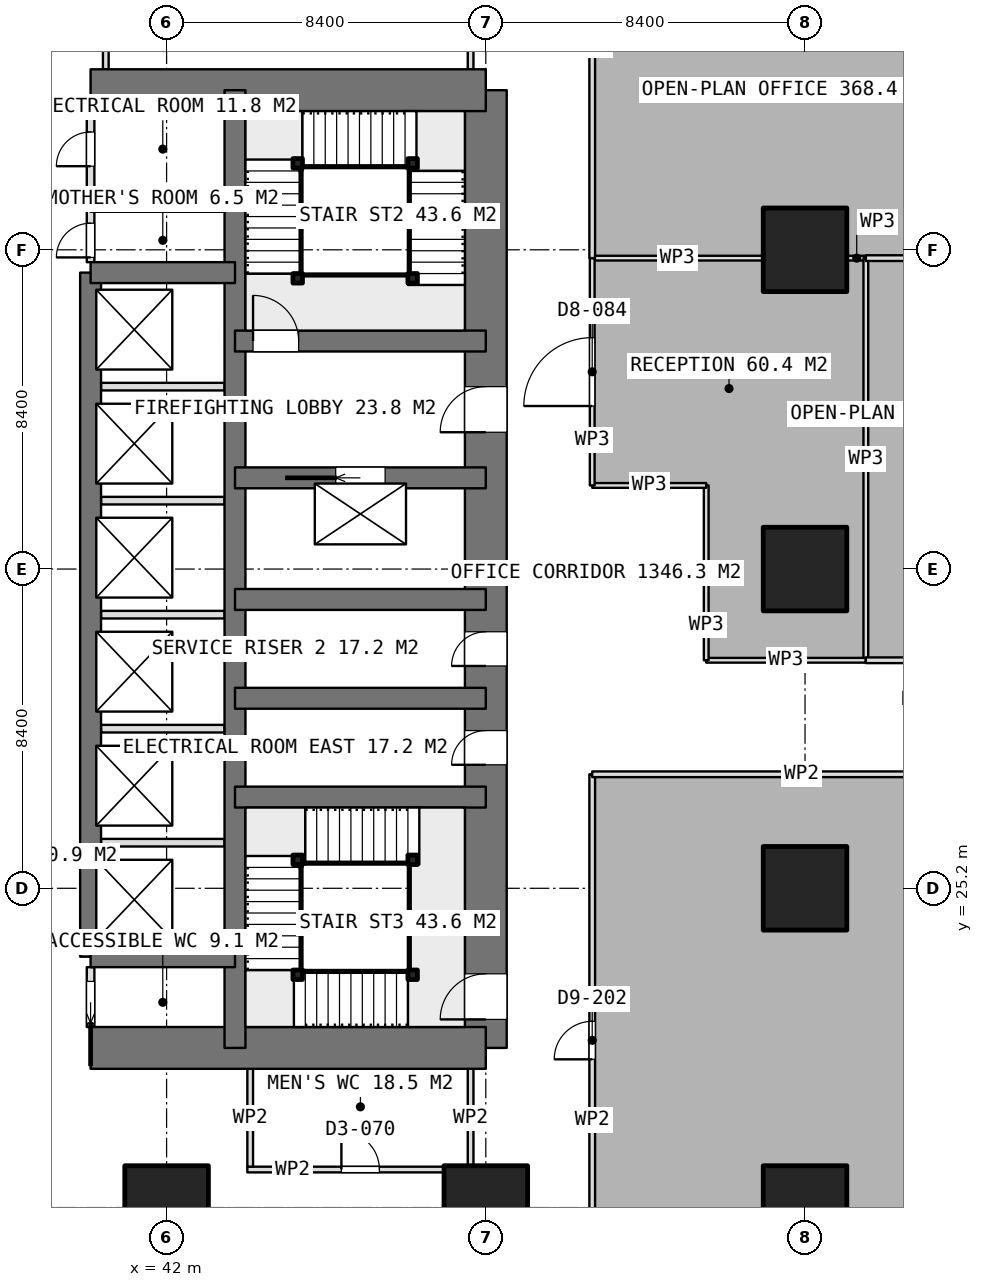
"""IFC4 building model, lengths in metres.
Left out: names, types, materials, properties, quantities, classifications, styles, units other than length and angle.
Written with IfcOpenShell. Run it as: python <this file> out.ifc"""

import sys

from ifc_helpers import new_model, si_unit, direction, frame, frame_2d, origin, origin_2d, place, context, subcontext, project, spatial, rectangle, extrude, element, fill, save


model = new_model("IFC4")
c1 = context("Model", 3, precision=1e-05, world=origin(), true_north=direction((0.0, 1.0)))
c2 = subcontext(c1, "Body", "Model", "MODEL_VIEW")
j1 = project(units=[si_unit("LENGTHUNIT", "METRE"), si_unit("PLANEANGLEUNIT", "RADIAN")], contexts=[c1])
p1 = place(None, origin())
s1 = spatial("IfcSite", under=j1, at=p1, CompositionType="ELEMENT")
p2 = place(p1, origin())
s2 = spatial("IfcBuilding", under=s1, at=p2, CompositionType="ELEMENT")
p3 = place(p2, frame((0.0, 0.0, 62.9)))
s3 = spatial("IfcBuildingStorey", under=s2, at=p3, CompositionType="ELEMENT", Elevation=62.9)
for number, where, z_axis, x_axis in (
    (1, (40.0, 21.0, 0.0), (0.0, 0.0, 1.0), (1.0, 0.0, 0.0)),
    (2, (40.0, 46.2, 0.0), (0.0, 0.0, 1.0), (1.0, 0.0, 0.0)),
):
    element("IfcWall", number, at=place(p3, frame(where, z_axis=z_axis, x_axis=x_axis)), inside=s3, PredefinedType="SHEAR", context=c2, shape_type="SweptSolid", body=[
        extrude(rectangle(XDim=10.4, YDim=1.1, at=frame_2d((5.2, 0.0))), origin(), (0.0, 0.0, 1.0), 3.75),
    ])
p4 = place(p3, frame((50.4, 21.0, 0.0), z_axis=(0.0, 0.0, 1.0), x_axis=(0.0, 1.0, 0.0)))
e3 = element("IfcWall", 3, at=p4, inside=s3, PredefinedType="SHEAR", context=c2, shape_type="SweptSolid", body=[
    extrude(rectangle(XDim=25.2, YDim=1.1, at=frame_2d((12.6, 0.0))), origin(), (0.0, 0.0, 1.0), 3.75),
])
p5 = place(p4, frame((16.2, 0.0, 0.0)))
e4 = element("IfcOpeningElement", 4, at=p5, cuts=e3, PredefinedType="OPENING", context=c2, shape_type="SweptSolid", body=[
    extrude(rectangle(XDim=1.2, YDim=2.1, at=frame_2d((0.6, 1.05))), frame((0.0, 0.56, 0.0), z_axis=(0.0, -1.0, 0.0), x_axis=(1.0, 0.0, 0.0)), (0.0, 0.0, 1.0), 1.12),
])
p6 = place(p4, frame((10.05, 0.0, 0.0)))
e5 = element("IfcOpeningElement", 5, at=p6, cuts=e3, PredefinedType="OPENING", context=c2, shape_type="SweptSolid", body=[
    extrude(rectangle(XDim=0.9, YDim=2.1, at=frame_2d((0.45, 1.05))), frame((0.0, 0.56, 0.0), z_axis=(0.0, -1.0, 0.0), x_axis=(1.0, 0.0, 0.0)), (0.0, 0.0, 1.0), 1.12),
])
p7 = place(p4, frame((7.45, 0.0, 0.0)))
e6 = element("IfcOpeningElement", 6, at=p7, cuts=e3, PredefinedType="OPENING", context=c2, shape_type="SweptSolid", body=[
    extrude(rectangle(XDim=0.9, YDim=2.1, at=frame_2d((0.45, 1.05))), frame((0.0, 0.56, 0.0), z_axis=(0.0, -1.0, 0.0), x_axis=(1.0, 0.0, 0.0)), (0.0, 0.0, 1.0), 1.12),
])
p8 = place(p4, frame((0.75, 0.0, 0.0)))
e7 = element("IfcOpeningElement", 7, at=p8, cuts=e3, PredefinedType="OPENING", context=c2, shape_type="SweptSolid", body=[
    extrude(rectangle(XDim=1.2, YDim=2.1, at=frame_2d((0.6, 1.05))), frame((0.0, 0.56, 0.0), z_axis=(0.0, -1.0, 0.0), x_axis=(1.0, 0.0, 0.0)), (0.0, 0.0, 1.0), 1.12),
])
p9 = place(p3, frame((43.8, 21.0, 0.0), z_axis=(0.0, 0.0, 1.0), x_axis=(0.0, 1.0, 0.0)))
e8 = element("IfcWall", 8, at=p9, inside=s3, PredefinedType="SHEAR", context=c2, shape_type="SweptSolid", body=[
    extrude(rectangle(XDim=25.2, YDim=0.55, at=frame_2d((12.6, 0.0))), origin(), (0.0, 0.0, 1.0), 3.75),
])
p10 = place(p3, frame((40.0, 23.4, 0.0), z_axis=(0.0, 0.0, 1.0), x_axis=(0.0, 1.0, 0.0)))
e9 = element("IfcWall", 9, at=p10, inside=s3, PredefinedType="SHEAR", context=c2, shape_type="SweptSolid", body=[
    extrude(rectangle(XDim=18.0, YDim=0.55, at=frame_2d((9.0, 0.0))), origin(), (0.0, 0.0, 1.0), 3.75),
])
for number, where, z_axis, x_axis in (
    (10, (40.0, 23.4, 0.0), (0.0, 0.0, 1.0), (1.0, 0.0, 0.0)),
    (11, (40.0, 41.4, 0.0), (0.0, 0.0, 1.0), (1.0, 0.0, 0.0)),
):
    element("IfcWall", number, at=place(p3, frame(where, z_axis=z_axis, x_axis=x_axis)), inside=s3, PredefinedType="SHEAR", context=c2, shape_type="SweptSolid", body=[
        extrude(rectangle(XDim=3.8, YDim=0.55, at=frame_2d((1.9, 0.0))), origin(), (0.0, 0.0, 1.0), 3.75),
    ])
for number, where, z_axis, x_axis in (
    (12, (43.8, 27.6, 0.0), (0.0, 0.0, 1.0), (1.0, 0.0, 0.0)),
    (13, (43.8, 30.2, 0.0), (0.0, 0.0, 1.0), (1.0, 0.0, 0.0)),
    (14, (43.8, 32.8, 0.0), (0.0, 0.0, 1.0), (1.0, 0.0, 0.0)),
):
    element("IfcWall", number, at=place(p3, frame(where, z_axis=z_axis, x_axis=x_axis)), inside=s3, PredefinedType="SHEAR", context=c2, shape_type="SweptSolid", body=[
        extrude(rectangle(XDim=6.6, YDim=0.55, at=frame_2d((3.3, 0.0))), origin(), (0.0, 0.0, 1.0), 3.75),
    ])
p11 = place(p3, frame((43.8, 36.0, 0.0), z_axis=(0.0, 0.0, 1.0), x_axis=(1.0, 0.0, 0.0)))
e15 = element("IfcWall", 15, at=p11, inside=s3, PredefinedType="SHEAR", context=c2, shape_type="SweptSolid", body=[
    extrude(rectangle(XDim=6.6, YDim=0.55, at=frame_2d((3.3, 0.0))), origin(), (0.0, 0.0, 1.0), 3.75),
])
p12 = place(p11, frame((2.65, 0.0, 0.0)))
e16 = element("IfcOpeningElement", 16, at=p12, cuts=e15, PredefinedType="OPENING", context=c2, shape_type="SweptSolid", body=[
    extrude(rectangle(XDim=1.3, YDim=2.1, at=frame_2d((0.65, 1.05))), frame((0.0, 0.285, 0.0), z_axis=(0.0, -1.0, 0.0), x_axis=(1.0, 0.0, 0.0)), (0.0, 0.0, 1.0), 0.57),
])
p13 = place(p3, frame((43.8, 39.6, 0.0), z_axis=(0.0, 0.0, 1.0), x_axis=(1.0, 0.0, 0.0)))
e17 = element("IfcWall", 17, at=p13, inside=s3, PredefinedType="SHEAR", context=c2, shape_type="SweptSolid", body=[
    extrude(rectangle(XDim=6.6, YDim=0.55, at=frame_2d((3.3, 0.0))), origin(), (0.0, 0.0, 1.0), 3.75),
])
p14 = place(p13, frame((0.475, 0.0, 0.0)))
e18 = element("IfcOpeningElement", 18, at=p14, cuts=e17, PredefinedType="OPENING", context=c2, shape_type="SweptSolid", body=[
    extrude(rectangle(XDim=1.2, YDim=2.1, at=frame_2d((0.6, 1.05))), frame((0.0, 0.285, 0.0), z_axis=(0.0, -1.0, 0.0), x_axis=(1.0, 0.0, 0.0)), (0.0, 0.0, 1.0), 0.57),
])
for number, where, z_axis, x_axis in (
    (19, (42.0, 16.8, 0.0), (0.0, 0.0, 1.0), (1.0, 0.0, 0.0)),
    (20, (50.4, 16.8, 0.0), (0.0, 0.0, 1.0), (1.0, 0.0, 0.0)),
    (21, (58.8, 16.8, 0.0), (0.0, 0.0, 1.0), (1.0, 0.0, 0.0)),
    (22, (58.8, 25.2, 0.0), (0.0, 0.0, 1.0), (1.0, 0.0, 0.0)),
    (23, (58.8, 33.6, 0.0), (0.0, 0.0, 1.0), (1.0, 0.0, 0.0)),
    (24, (58.8, 42.0, 0.0), (0.0, 0.0, 1.0), (1.0, 0.0, 0.0)),
):
    element("IfcColumn", number, at=place(p3, frame(where, z_axis=z_axis, x_axis=x_axis)), inside=s3, PredefinedType="COLUMN", context=c2, shape_type="SweptSolid", body=[
        extrude(rectangle(XDim=2.2, YDim=2.2, at=origin_2d()), origin(), (0.0, 0.0, 1.0), 3.75),
    ])
for number, where, z_axis, x_axis in (
    (25, (40.275, 26.4, 0.0), (0.0, 0.0, 1.0), (1.0, 0.0, 0.0)),
    (26, (40.275, 29.4, 0.0), (0.0, 0.0, 1.0), (1.0, 0.0, 0.0)),
    (27, (40.275, 32.4, 0.0), (0.0, 0.0, 1.0), (1.0, 0.0, 0.0)),
    (28, (40.275, 35.4, 0.0), (0.0, 0.0, 1.0), (1.0, 0.0, 0.0)),
    (29, (40.275, 38.4, 0.0), (0.0, 0.0, 1.0), (1.0, 0.0, 0.0)),
):
    element("IfcWall", number, at=place(p3, frame(where, z_axis=z_axis, x_axis=x_axis)), inside=s3, PredefinedType="PARTITIONING", context=c2, shape_type="SweptSolid", body=[
        extrude(rectangle(XDim=3.25, YDim=0.2, at=frame_2d((1.625, 0.0))), origin(), (0.0, 0.0, 1.0), 3.5),
    ])
p15 = place(p3, frame((40.0, 21.55, 0.0), z_axis=(0.0, 0.0, 1.0), x_axis=(0.0, 1.0, 0.0)))
e30 = element("IfcWall", 30, at=p15, inside=s3, PredefinedType="PARTITIONING", context=c2, shape_type="SweptSolid", body=[
    extrude(rectangle(XDim=1.575, YDim=0.2, at=frame_2d((0.788, 0.0))), origin(), (0.0, 0.0, 1.0), 3.5),
])
p16 = place(p15, frame((0.1, 0.0, 0.0)))
e31 = element("IfcOpeningElement", 31, at=p16, cuts=e30, PredefinedType="OPENING", context=c2, shape_type="SweptSolid", body=[
    extrude(rectangle(XDim=1.1, YDim=2.1, at=frame_2d((0.55, 1.05))), frame((0.0, 0.11, 0.0), z_axis=(0.0, -1.0, 0.0), x_axis=(1.0, 0.0, 0.0)), (0.0, 0.0, 1.0), 0.22),
])
p17 = place(p3, frame((40.0, 41.675, 0.0), z_axis=(0.0, 0.0, 1.0), x_axis=(0.0, 1.0, 0.0)))
e32 = element("IfcWall", 32, at=p17, inside=s3, PredefinedType="PARTITIONING", context=c2, shape_type="SweptSolid", body=[
    extrude(rectangle(XDim=3.975, YDim=0.2, at=frame_2d((1.987, 0.0))), origin(), (0.0, 0.0, 1.0), 3.5),
])
p18 = place(p17, frame((2.525, 0.0, 0.0)))
e33 = element("IfcOpeningElement", 33, at=p18, cuts=e32, PredefinedType="OPENING", context=c2, shape_type="SweptSolid", body=[
    extrude(rectangle(XDim=0.9, YDim=2.1, at=frame_2d((0.45, 1.05))), frame((0.0, 0.11, 0.0), z_axis=(0.0, -1.0, 0.0), x_axis=(1.0, 0.0, 0.0)), (0.0, 0.0, 1.0), 0.22),
])
p19 = place(p17, frame((0.125, 0.0, 0.0)))
e34 = element("IfcOpeningElement", 34, at=p19, cuts=e32, PredefinedType="OPENING", context=c2, shape_type="SweptSolid", body=[
    extrude(rectangle(XDim=0.9, YDim=2.1, at=frame_2d((0.45, 1.05))), frame((0.0, 0.11, 0.0), z_axis=(0.0, -1.0, 0.0), x_axis=(1.0, 0.0, 0.0)), (0.0, 0.0, 1.0), 0.22),
])
p20 = place(p3, frame((40.0, 43.1, 0.0), z_axis=(0.0, 0.0, 1.0), x_axis=(1.0, 0.0, 0.0)))
e35 = element("IfcWall", 35, at=p20, inside=s3, PredefinedType="PARTITIONING", context=c2, shape_type="SweptSolid", body=[
    extrude(rectangle(XDim=3.525, YDim=0.2, at=frame_2d((1.762, 0.0))), origin(), (0.0, 0.0, 1.0), 3.5),
])
for number, where, z_axis, x_axis in (
    (36, (40.4, 46.75, 0.0), (0.0, 0.0, 1.0), (0.0, 1.0, 0.0)),
    (37, (50.0, 46.75, 0.0), (0.0, 0.0, 1.0), (0.0, 1.0, 0.0)),
):
    element("IfcWall", number, at=place(p3, frame(where, z_axis=z_axis, x_axis=x_axis)), inside=s3, PredefinedType="PARTITIONING", context=c2, shape_type="SweptSolid", body=[
        extrude(rectangle(XDim=2.575, YDim=0.15, at=frame_2d((1.288, 0.0))), origin(), (0.0, 0.0, 1.0), 3.5),
    ])
p21 = place(p3, frame((44.125, 17.8, 0.0), z_axis=(0.0, 0.0, 1.0), x_axis=(1.0, 0.0, 0.0)))
e38 = element("IfcWall", 38, at=p21, inside=s3, PredefinedType="PARTITIONING", context=c2, shape_type="SweptSolid", body=[
    extrude(rectangle(XDim=5.95, YDim=0.15, at=frame_2d((2.975, 0.0))), origin(), (0.0, 0.0, 1.0), 3.5),
])
p22 = place(p21, frame((2.475, 0.0, 0.0)))
e39 = element("IfcOpeningElement", 39, at=p22, cuts=e38, PredefinedType="OPENING", context=c2, shape_type="SweptSolid", body=[
    extrude(rectangle(XDim=1.0, YDim=2.1, at=frame_2d((0.5, 1.05))), frame((0.0, 0.085, 0.0), z_axis=(0.0, -1.0, 0.0), x_axis=(1.0, 0.0, 0.0)), (0.0, 0.0, 1.0), 0.17),
])
for number, where, z_axis, x_axis in (
    (40, (44.2, 17.875, 0.0), (0.0, 0.0, 1.0), (0.0, 1.0, 0.0)),
    (41, (50.0, 17.875, 0.0), (0.0, 0.0, 1.0), (0.0, 1.0, 0.0)),
):
    element("IfcWall", number, at=place(p3, frame(where, z_axis=z_axis, x_axis=x_axis)), inside=s3, PredefinedType="PARTITIONING", context=c2, shape_type="SweptSolid", body=[
        extrude(rectangle(XDim=2.575, YDim=0.15, at=frame_2d((1.288, 0.0))), origin(), (0.0, 0.0, 1.0), 3.5),
    ])
p23 = place(p3, frame((53.2, 14.2, 0.0), z_axis=(0.0, 0.0, 1.0), x_axis=(0.0, 1.0, 0.0)))
e42 = element("IfcWall", 42, at=p23, inside=s3, PredefinedType="PARTITIONING", context=c2, shape_type="SweptSolid", body=[
    extrude(rectangle(XDim=14.0, YDim=0.15, at=frame_2d((7.0, 0.0))), origin(), (0.0, 0.0, 1.0), 3.5),
])
p24 = place(p23, frame((6.5, 0.0, 0.0)))
e43 = element("IfcOpeningElement", 43, at=p24, cuts=e42, PredefinedType="OPENING", context=c2, shape_type="SweptSolid", body=[
    extrude(rectangle(XDim=1.0, YDim=2.1, at=frame_2d((0.5, 1.05))), frame((0.0, 0.085, 0.0), z_axis=(0.0, -1.0, 0.0), x_axis=(1.0, 0.0, 0.0)), (0.0, 0.0, 1.0), 0.17),
])
p25 = place(p3, frame((53.2, 28.2, 0.0), z_axis=(0.0, 0.0, 1.0), x_axis=(1.0, 0.0, 0.0)))
e44 = element("IfcWall", 44, at=p25, inside=s3, PredefinedType="PARTITIONING", context=c2, shape_type="SweptSolid", body=[
    extrude(rectangle(XDim=11.019, YDim=0.15, at=frame_2d((5.51, 0.0))), origin(), (0.0, 0.0, 1.0), 3.5),
])
p26 = place(p3, frame((53.2, 41.781, 0.0), z_axis=(0.0, 0.0, 1.0), x_axis=(1.0, 0.0, 0.0)))
e45 = element("IfcWall", 45, at=p26, inside=s3, PredefinedType="PARTITIONING", context=c2, shape_type="SweptSolid", body=[
    extrude(rectangle(XDim=4.48, YDim=0.125, at=frame_2d((2.24, 0.0))), origin(), (0.0, 0.0, 1.0), 3.5),
])
p27 = place(p3, frame((59.92, 41.781, 0.0), z_axis=(0.0, 0.0, 1.0), x_axis=(1.0, 0.0, 0.0)))
e46 = element("IfcWall", 46, at=p27, inside=s3, PredefinedType="PARTITIONING", context=c2, shape_type="SweptSolid", body=[
    extrude(rectangle(XDim=0.48, YDim=0.125, at=frame_2d((0.24, 0.0))), origin(), (0.0, 0.0, 1.0), 3.5),
])
p28 = place(p3, frame((60.4, 41.781, 0.0), z_axis=(0.0, 0.0, 1.0), x_axis=(0.0, -1.0, 0.0)))
e47 = element("IfcWall", 47, at=p28, inside=s3, PredefinedType="PARTITIONING", context=c2, shape_type="SweptSolid", body=[
    extrude(rectangle(XDim=10.581, YDim=0.125, at=frame_2d((5.291, 0.0))), origin(), (0.0, 0.0, 1.0), 3.5),
])
p29 = place(p3, frame((60.4, 31.2, 0.0), z_axis=(0.0, 0.0, 1.0), x_axis=(-1.0, 0.0, 0.0)))
e48 = element("IfcWall", 48, at=p29, inside=s3, PredefinedType="PARTITIONING", context=c2, shape_type="SweptSolid", body=[
    extrude(rectangle(XDim=4.2, YDim=0.125, at=frame_2d((2.1, 0.0))), origin(), (0.0, 0.0, 1.0), 3.5),
])
p30 = place(p3, frame((56.2, 31.2, 0.0), z_axis=(0.0, 0.0, 1.0), x_axis=(0.0, 1.0, 0.0)))
e49 = element("IfcWall", 49, at=p30, inside=s3, PredefinedType="PARTITIONING", context=c2, shape_type="SweptSolid", body=[
    extrude(rectangle(XDim=4.6, YDim=0.125, at=frame_2d((2.3, 0.0))), origin(), (0.0, 0.0, 1.0), 3.5),
])
p31 = place(p3, frame((56.2, 35.8, 0.0), z_axis=(0.0, 0.0, 1.0), x_axis=(-1.0, 0.0, 0.0)))
e50 = element("IfcWall", 50, at=p31, inside=s3, PredefinedType="PARTITIONING", context=c2, shape_type="SweptSolid", body=[
    extrude(rectangle(XDim=3.0, YDim=0.125, at=frame_2d((1.5, 0.0))), origin(), (0.0, 0.0, 1.0), 3.5),
])
p32 = place(p3, frame((53.2, 35.8, 0.0), z_axis=(0.0, 0.0, 1.0), x_axis=(0.0, 1.0, 0.0)))
e51 = element("IfcWall", 51, at=p32, inside=s3, PredefinedType="PARTITIONING", context=c2, shape_type="SweptSolid", body=[
    extrude(rectangle(XDim=5.981, YDim=0.125, at=frame_2d((2.99, 0.0))), origin(), (0.0, 0.0, 1.0), 3.5),
])
p33 = place(p32, frame((2.09, 0.0, 0.0)))
e52 = element("IfcOpeningElement", 52, at=p33, cuts=e51, PredefinedType="OPENING", context=c2, shape_type="SweptSolid", body=[
    extrude(rectangle(XDim=1.8, YDim=2.1, at=frame_2d((0.9, 1.05))), frame((0.0, 0.073, 0.0), z_axis=(0.0, -1.0, 0.0), x_axis=(1.0, 0.0, 0.0)), (0.0, 0.0, 1.0), 0.145),
])
p34 = place(p3, frame((64.091, 31.2, 0.0), z_axis=(0.0, 0.0, 1.0), x_axis=(-1.0, 0.0, 0.0)))
e53 = element("IfcWall", 53, at=p34, inside=s3, PredefinedType="PARTITIONING", context=c2, shape_type="SweptSolid", body=[
    extrude(rectangle(XDim=3.691, YDim=0.15, at=frame_2d((1.846, 0.0))), origin(), (0.0, 0.0, 1.0), 3.5),
])
p35 = place(p34, frame((1.346, 0.0, 0.0)))
e54 = element("IfcOpeningElement", 54, at=p35, cuts=e53, PredefinedType="OPENING", context=c2, shape_type="SweptSolid", body=[
    extrude(rectangle(XDim=1.0, YDim=2.1, at=frame_2d((0.5, 1.05))), frame((0.0, 0.085, 0.0), z_axis=(0.0, -1.0, 0.0), x_axis=(1.0, 0.0, 0.0)), (0.0, 0.0, 1.0), 0.17),
])
p36 = place(p3, frame((60.4, 41.781, 0.0), z_axis=(0.0, 0.0, 1.0), x_axis=(1.0, 0.0, 0.0)))
e55 = element("IfcWall", 55, at=p36, inside=s3, PredefinedType="PARTITIONING", context=c2, shape_type="SweptSolid", body=[
    extrude(rectangle(XDim=3.239, YDim=0.15, at=frame_2d((1.62, 0.0))), origin(), (0.0, 0.0, 1.0), 3.5),
])
p37 = place(p3, frame((53.2, 41.782, 0.0), z_axis=(0.0, 0.0, 1.0), x_axis=(0.0, 1.0, 0.0)))
e56 = element("IfcWall", 56, at=p37, inside=s3, PredefinedType="PARTITIONING", context=c2, shape_type="SweptSolid", body=[
    extrude(rectangle(XDim=11.218, YDim=0.15, at=frame_2d((5.609, 0.0))), origin(), (0.0, 0.0, 1.0), 3.5),
])
for number, where, z_axis, x_axis in (
    (57, (45.45, 41.25, 0.0), (0.0, 0.0, 1.0), (1.0, 0.0, 0.0)),
    (58, (45.45, 44.275, 0.0), (0.0, 0.0, 1.0), (1.0, 0.0, 0.0)),
    (59, (48.475, 44.275, 0.0), (0.0, 0.0, 1.0), (1.0, 0.0, 0.0)),
    (60, (48.475, 41.25, 0.0), (0.0, 0.0, 1.0), (1.0, 0.0, 0.0)),
    (61, (48.475, 22.925, 0.0), (0.0, 0.0, 1.0), (1.0, 0.0, 0.0)),
    (62, (45.45, 22.925, 0.0), (0.0, 0.0, 1.0), (1.0, 0.0, 0.0)),
    (63, (45.45, 25.95, 0.0), (0.0, 0.0, 1.0), (1.0, 0.0, 0.0)),
    (64, (48.475, 25.95, 0.0), (0.0, 0.0, 1.0), (1.0, 0.0, 0.0)),
):
    element("IfcColumn", number, at=place(p3, frame(where, z_axis=z_axis, x_axis=x_axis)), inside=s3, PredefinedType="COLUMN", context=c2, shape_type="SweptSolid", body=[
        extrude(rectangle(XDim=0.25, YDim=0.25, at=origin_2d()), origin(), (0.0, 0.0, 1.0), 3.75),
    ])
p38 = place(p5, origin())
e65 = element("IfcDoor", 65, at=p38, inside=s3, OperationType="SINGLE_SWING_LEFT", PredefinedType="DOOR", context=c2, shape_type="SweptSolid", body=[
    extrude(rectangle(XDim=1.2, YDim=2.1, at=frame_2d((0.6, 1.05))), frame((0.0, 0.025, 0.0), z_axis=(0.0, -1.0, 0.0), x_axis=(1.0, 0.0, 0.0)), (0.0, 0.0, 1.0), 0.05),
])
fill(e4, e65)
p39 = place(p6, origin())
e66 = element("IfcDoor", 66, at=p39, inside=s3, OperationType="SINGLE_SWING_LEFT", PredefinedType="DOOR", context=c2, shape_type="SweptSolid", body=[
    extrude(rectangle(XDim=0.9, YDim=2.1, at=frame_2d((0.45, 1.05))), frame((0.0, 0.025, 0.0), z_axis=(0.0, -1.0, 0.0), x_axis=(1.0, 0.0, 0.0)), (0.0, 0.0, 1.0), 0.05),
])
fill(e5, e66)
p40 = place(p7, origin())
e67 = element("IfcDoor", 67, at=p40, inside=s3, OperationType="SINGLE_SWING_LEFT", PredefinedType="DOOR", context=c2, shape_type="SweptSolid", body=[
    extrude(rectangle(XDim=0.9, YDim=2.1, at=frame_2d((0.45, 1.05))), frame((0.0, 0.025, 0.0), z_axis=(0.0, -1.0, 0.0), x_axis=(1.0, 0.0, 0.0)), (0.0, 0.0, 1.0), 0.05),
])
fill(e6, e67)
p41 = place(p16, origin())
e68 = element("IfcDoor", 68, at=p41, inside=s3, OperationType="SLIDING_TO_LEFT", PredefinedType="DOOR", context=c2, shape_type="SweptSolid", body=[
    extrude(rectangle(XDim=1.1, YDim=2.1, at=frame_2d((0.55, 1.05))), frame((0.0, 0.025, 0.0), z_axis=(0.0, -1.0, 0.0), x_axis=(1.0, 0.0, 0.0)), (0.0, 0.0, 1.0), 0.05),
])
fill(e31, e68)
p42 = place(p18, origin())
e69 = element("IfcDoor", 69, at=p42, inside=s3, OperationType="SINGLE_SWING_LEFT", PredefinedType="DOOR", context=c2, shape_type="SweptSolid", body=[
    extrude(rectangle(XDim=0.9, YDim=2.1, at=frame_2d((0.45, 1.05))), frame((0.0, 0.025, 0.0), z_axis=(0.0, -1.0, 0.0), x_axis=(1.0, 0.0, 0.0)), (0.0, 0.0, 1.0), 0.05),
])
fill(e33, e69)
p43 = place(p19, origin())
e70 = element("IfcDoor", 70, at=p43, inside=s3, OperationType="SINGLE_SWING_LEFT", PredefinedType="DOOR", context=c2, shape_type="SweptSolid", body=[
    extrude(rectangle(XDim=0.9, YDim=2.1, at=frame_2d((0.45, 1.05))), frame((0.0, 0.025, 0.0), z_axis=(0.0, -1.0, 0.0), x_axis=(1.0, 0.0, 0.0)), (0.0, 0.0, 1.0), 0.05),
])
fill(e34, e70)
p44 = place(p12, origin())
e71 = element("IfcDoor", 71, at=p44, inside=s3, OperationType="SLIDING_TO_LEFT", PredefinedType="USERDEFINED", context=c2, shape_type="SweptSolid", body=[
    extrude(rectangle(XDim=1.3, YDim=2.1, at=frame_2d((0.65, 1.05))), frame((0.0, 0.025, 0.0), z_axis=(0.0, -1.0, 0.0), x_axis=(1.0, 0.0, 0.0)), (0.0, 0.0, 1.0), 0.05),
])
fill(e16, e71)
p45 = place(p22, origin())
e72 = element("IfcDoor", 72, at=p45, inside=s3, OperationType="SINGLE_SWING_LEFT", PredefinedType="DOOR", context=c2, shape_type="SweptSolid", body=[
    extrude(rectangle(XDim=1.0, YDim=2.1, at=frame_2d((0.5, 1.05))), frame((0.0, 0.025, 0.0), z_axis=(0.0, -1.0, 0.0), x_axis=(1.0, 0.0, 0.0)), (0.0, 0.0, 1.0), 0.05),
])
fill(e39, e72)
p46 = place(p24, origin())
e73 = element("IfcDoor", 73, at=p46, inside=s3, OperationType="SINGLE_SWING_LEFT", PredefinedType="DOOR", context=c2, shape_type="SweptSolid", body=[
    extrude(rectangle(XDim=1.0, YDim=2.1, at=frame_2d((0.5, 1.05))), frame((0.0, 0.025, 0.0), z_axis=(0.0, -1.0, 0.0), x_axis=(1.0, 0.0, 0.0)), (0.0, 0.0, 1.0), 0.05),
])
fill(e43, e73)
p47 = place(p33, origin())
e74 = element("IfcDoor", 74, at=p47, inside=s3, OperationType="DOUBLE_DOOR_SINGLE_SWING", PredefinedType="DOOR", context=c2, shape_type="SweptSolid", body=[
    extrude(rectangle(XDim=1.8, YDim=2.1, at=frame_2d((0.9, 1.05))), frame((0.0, 0.025, 0.0), z_axis=(0.0, -1.0, 0.0), x_axis=(1.0, 0.0, 0.0)), (0.0, 0.0, 1.0), 0.05),
])
fill(e52, e74)
p48 = place(p14, origin())
e75 = element("IfcDoor", 75, at=p48, inside=s3, OperationType="SINGLE_SWING_RIGHT", PredefinedType="DOOR", context=c2, shape_type="SweptSolid", body=[
    extrude(rectangle(XDim=1.2, YDim=2.1, at=frame_2d((0.6, 1.05))), frame((0.0, 0.025, 0.0), z_axis=(0.0, -1.0, 0.0), x_axis=(1.0, 0.0, 0.0)), (0.0, 0.0, 1.0), 0.05),
])
fill(e18, e75)
p49 = place(p8, origin())
e76 = element("IfcDoor", 76, at=p49, inside=s3, OperationType="SINGLE_SWING_RIGHT", PredefinedType="DOOR", context=c2, shape_type="SweptSolid", body=[
    extrude(rectangle(XDim=1.2, YDim=2.1, at=frame_2d((0.6, 1.05))), frame((0.0, 0.025, 0.0), z_axis=(0.0, -1.0, 0.0), x_axis=(1.0, 0.0, 0.0)), (0.0, 0.0, 1.0), 0.05),
])
fill(e7, e76)
save(model, sys.argv[1])
